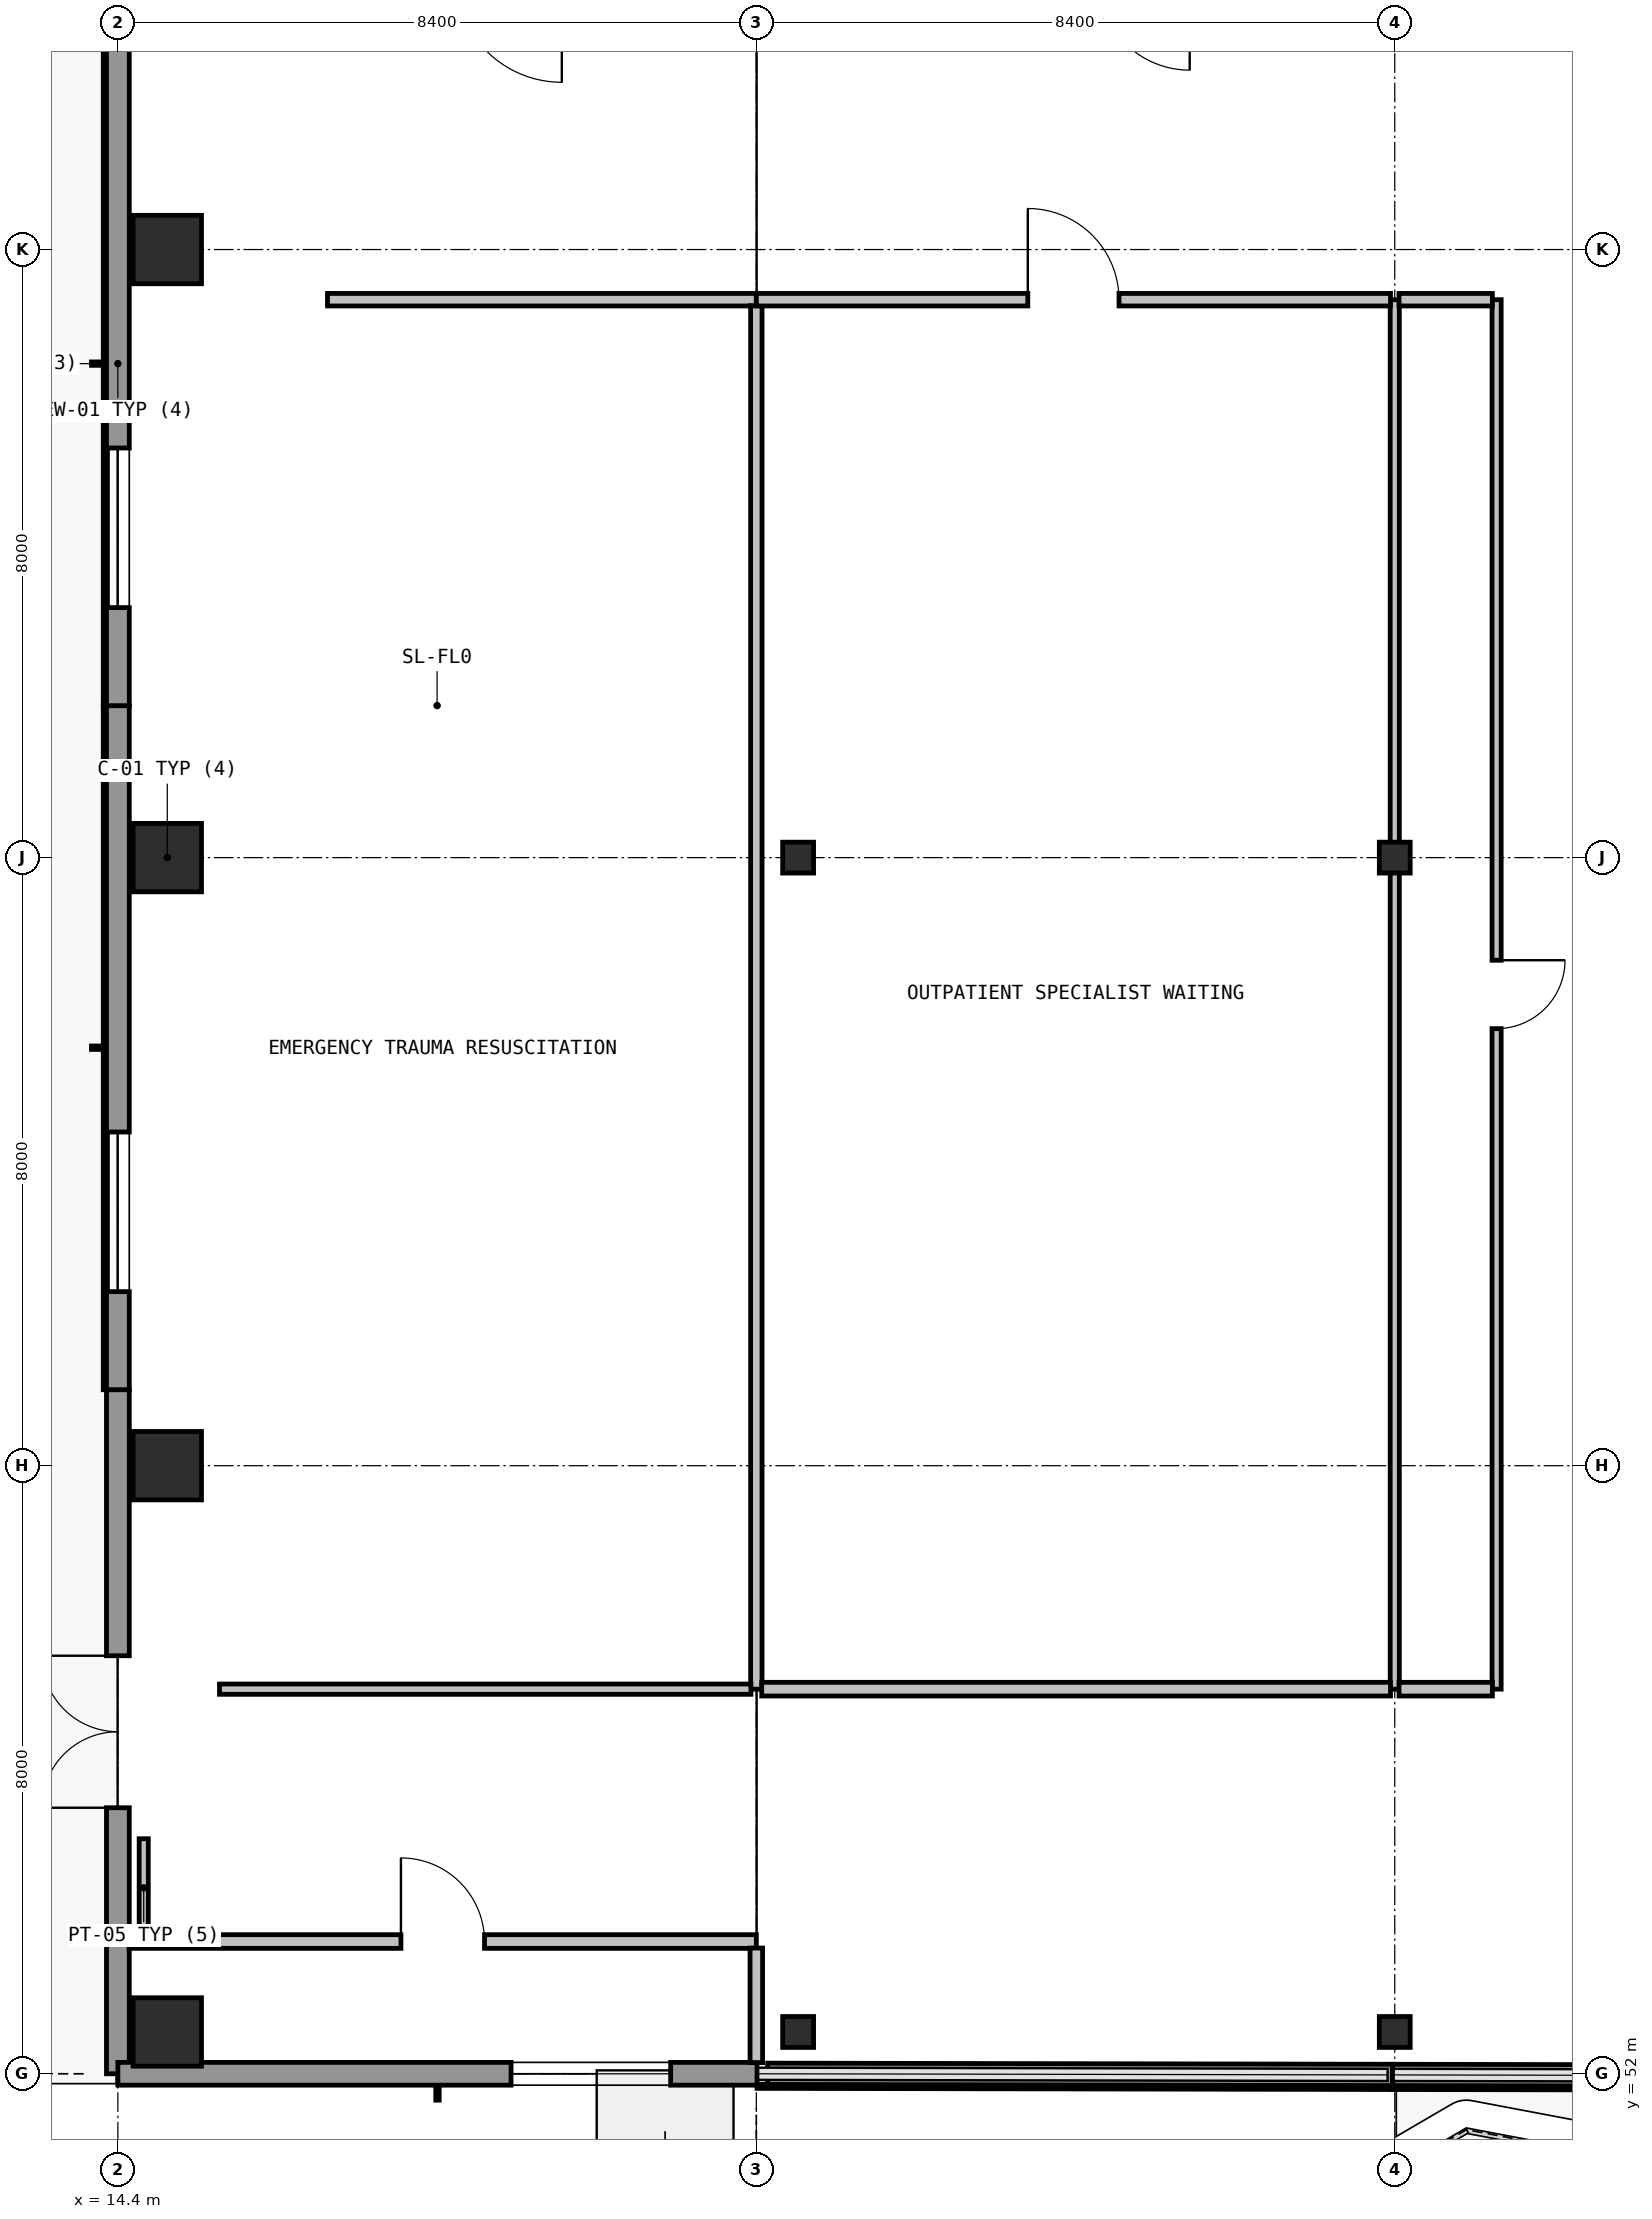
"""IFC4 building model, lengths in metres.
Left out: names, types, materials, properties, quantities, classifications, styles, units other than length and angle.
Written with IfcOpenShell. Run it as: python <this file> out.ifc"""

import sys

from ifc_helpers import new_model, si_unit, direction, frame, frame_2d, origin, origin_2d, place, context, subcontext, project, spatial, rectangle, hollow_circle, extrude, element, fill, save


model = new_model("IFC4")
c1 = context("Model", 3, precision=1e-05, world=origin(), true_north=direction((0.0, 1.0)))
c2 = subcontext(c1, "Body", "Model", "MODEL_VIEW")
j1 = project(units=[si_unit("LENGTHUNIT", "METRE"), si_unit("PLANEANGLEUNIT", "RADIAN")], contexts=[c1])
p1 = place(None, origin())
s1 = spatial("IfcSite", under=j1, at=p1, CompositionType="ELEMENT")
p2 = place(p1, origin())
s2 = spatial("IfcBuilding", under=s1, at=p2, CompositionType="ELEMENT")
p3 = place(p2, origin())
s3 = spatial("IfcBuildingStorey", under=s2, at=p3, CompositionType="ELEMENT", Elevation=0.0)
for number, where, z_axis, x_axis in (
    (1, (23.35, 52.55, 0.0), (0.0, 0.0, 1.0), (1.0, 0.0, 0.0)),
    (2, (23.35, 68.0, 0.0), (0.0, 0.0, 1.0), (1.0, 0.0, 0.0)),
    (3, (31.2, 52.55, 0.0), (0.0, 0.0, 1.0), (1.0, 0.0, 0.0)),
    (4, (31.2, 68.0, 0.0), (0.0, 0.0, 1.0), (1.0, 0.0, 0.0)),
):
    element("IfcColumn", number, at=place(p3, frame(where, z_axis=z_axis, x_axis=x_axis)), inside=s3, PredefinedType="COLUMN", context=c2, shape_type="SweptSolid", body=[
        extrude(hollow_circle(Radius=0.203, WallThickness=0.016, at=origin_2d()), origin(), (0.0, 0.0, 1.0), 5.4),
    ])
for number, where, z_axis, x_axis in (
    (5, (15.05, 52.55, 0.0), (0.0, 0.0, 1.0), (1.0, 0.0, 0.0)),
    (6, (15.05, 60.0, 0.0), (0.0, 0.0, 1.0), (1.0, 0.0, 0.0)),
    (7, (15.05, 68.0, 0.0), (0.0, 0.0, 1.0), (1.0, 0.0, 0.0)),
    (8, (15.05, 76.0, 0.0), (0.0, 0.0, 1.0), (1.0, 0.0, 0.0)),
):
    element("IfcColumn", number, at=place(p3, frame(where, z_axis=z_axis, x_axis=x_axis)), inside=s3, PredefinedType="COLUMN", context=c2, shape_type="SweptSolid", body=[
        extrude(rectangle(XDim=0.9, YDim=0.9, at=origin_2d()), origin(), (0.0, 0.0, 1.0), 5.4),
    ])
p4 = place(p3, frame((14.4, 52.0, 0.0), z_axis=(0.0, 0.0, 1.0), x_axis=(0.0, 1.0, 0.0)))
e9 = element("IfcWall", 9, at=p4, inside=s3, PredefinedType="SOLIDWALL", context=c2, shape_type="SweptSolid", body=[
    extrude(rectangle(XDim=9.0, YDim=0.3, at=frame_2d((4.5, 0.0))), origin(), (0.0, 0.0, 1.0), 5.08),
])
p5 = place(p4, frame((3.5, 0.0, 0.0)))
e10 = element("IfcOpeningElement", 10, at=p5, cuts=e9, PredefinedType="OPENING", context=c2, shape_type="SweptSolid", body=[
    extrude(rectangle(XDim=2.0, YDim=2.3, at=frame_2d((1.0, 1.15))), frame((0.0, 0.16, 0.0), z_axis=(0.0, -1.0, 0.0), x_axis=(1.0, 0.0, 0.0)), (0.0, 0.0, 1.0), 0.32),
])
p6 = place(p3, frame((14.4, 61.0, 0.0), z_axis=(0.0, 0.0, 1.0), x_axis=(0.0, 1.0, 0.0)))
e11 = element("IfcWall", 11, at=p6, inside=s3, PredefinedType="SOLIDWALL", context=c2, shape_type="SweptSolid", body=[
    extrude(rectangle(XDim=8.999, YDim=0.3, at=frame_2d((4.5, 0.0))), origin(), (0.0, 0.0, 1.0), 5.08),
])
p7 = place(p6, frame((1.29, 0.0, 0.96)))
e12 = element("IfcOpeningElement", 12, at=p7, cuts=e11, PredefinedType="OPENING", context=c2, shape_type="SweptSolid", body=[
    extrude(rectangle(XDim=2.1, YDim=1.5, at=frame_2d((1.05, 0.75))), frame((0.0, 0.16, 0.0), z_axis=(0.0, -1.0, 0.0), x_axis=(1.0, 0.0, 0.0)), (0.0, 0.0, 1.0), 0.32),
])
p8 = place(p3, frame((14.4, 69.999, 0.0), z_axis=(0.0, 0.0, 1.0), x_axis=(0.0, 1.0, 0.0)))
e13 = element("IfcWall", 13, at=p8, inside=s3, PredefinedType="SOLIDWALL", context=c2, shape_type="SweptSolid", body=[
    extrude(rectangle(XDim=9.0, YDim=0.3, at=frame_2d((4.5, 0.0))), origin(), (0.0, 0.0, 1.0), 5.08),
])
p9 = place(p8, frame((1.29, 0.0, 0.96)))
e14 = element("IfcOpeningElement", 14, at=p9, cuts=e13, PredefinedType="OPENING", context=c2, shape_type="SweptSolid", body=[
    extrude(rectangle(XDim=2.1, YDim=1.5, at=frame_2d((1.05, 0.75))), frame((0.0, 0.16, 0.0), z_axis=(0.0, -1.0, 0.0), x_axis=(1.0, 0.0, 0.0)), (0.0, 0.0, 1.0), 0.32),
])
p10 = place(p3, frame((39.531, 51.97, 0.0), z_axis=(0.0, 0.0, 1.0), x_axis=(-0.999998360026, 0.001811062053, 0.0)))
e15 = element("IfcWall", 15, at=p10, inside=s3, PredefinedType="SOLIDWALL", context=c2, shape_type="SweptSolid", body=[
    extrude(rectangle(XDim=8.358, YDim=0.28, at=frame_2d((4.179, 0.0))), origin(), (0.0, 0.0, 1.0), 0.94),
])
p11 = place(p3, frame((31.169, 51.985, 0.0), z_axis=(0.0, 0.0, 1.0), x_axis=(-0.999998358775, 0.001811752647, 0.0)))
e16 = element("IfcWall", 16, at=p11, inside=s3, PredefinedType="SOLIDWALL", context=c2, shape_type="SweptSolid", body=[
    extrude(rectangle(XDim=8.22, YDim=0.28, at=frame_2d((4.11, 0.0))), origin(), (0.0, 0.0, 1.0), 0.94),
])
p12 = place(p3, frame((22.809, 52.0, 0.0), z_axis=(0.0, 0.0, 1.0), x_axis=(-1.0, 0.0, 0.0)))
e17 = element("IfcWall", 17, at=p12, inside=s3, PredefinedType="SOLIDWALL", context=c2, shape_type="SweptSolid", body=[
    extrude(rectangle(XDim=8.409, YDim=0.3, at=frame_2d((4.205, 0.0))), origin(), (0.0, 0.0, 1.0), 5.08),
])
p13 = place(p12, frame((1.136, 0.0, 0.96)))
e18 = element("IfcOpeningElement", 18, at=p13, cuts=e17, PredefinedType="OPENING", context=c2, shape_type="SweptSolid", body=[
    extrude(rectangle(XDim=2.1, YDim=1.5, at=frame_2d((1.05, 0.75))), frame((0.0, 0.16, 0.0), z_axis=(0.0, -1.0, 0.0), x_axis=(1.0, 0.0, 0.0)), (0.0, 0.0, 1.0), 0.32),
])
p14 = place(p3, frame((17.158, 75.34, 0.0), z_axis=(0.0, 0.0, 1.0), x_axis=(1.0, 0.0, 0.0)))
e19 = element("IfcWall", 19, at=p14, inside=s3, PredefinedType="PARTITIONING", context=c2, shape_type="SweptSolid", body=[
    extrude(rectangle(XDim=5.642, YDim=0.165, at=frame_2d((2.821, 0.0))), origin(), (0.0, 0.0, 1.0), 5.08),
])
p15 = place(p3, frame((22.8, 75.261, 0.0), z_axis=(0.0, 0.0, 1.0), x_axis=(0.0, -1.0, 0.0)))
e20 = element("IfcWall", 20, at=p15, inside=s3, PredefinedType="PARTITIONING", context=c2, shape_type="SweptSolid", body=[
    extrude(rectangle(XDim=18.201, YDim=0.15, at=frame_2d((9.101, 0.0))), origin(), (0.0, 0.0, 1.0), 5.08),
])
p16 = place(p3, frame((22.729, 57.06, 0.0), z_axis=(0.0, 0.0, 1.0), x_axis=(-1.0, 0.0, 0.0)))
e21 = element("IfcWall", 21, at=p16, inside=s3, PredefinedType="PARTITIONING", context=c2, shape_type="SweptSolid", body=[
    extrude(rectangle(XDim=6.992, YDim=0.135, at=frame_2d((3.496, 0.0))), origin(), (0.0, 0.0, 1.0), 5.08),
])
p17 = place(p3, frame((14.74, 55.092, 0.0), z_axis=(0.0, 0.0, 1.0), x_axis=(0.0, -1.0, 0.0)))
e22 = element("IfcWall", 22, at=p17, inside=s3, PredefinedType="PARTITIONING", context=c2, shape_type="SweptSolid", body=[
    extrude(rectangle(XDim=1.292, YDim=0.12, at=frame_2d((0.646, 0.0))), origin(), (0.0, 0.0, 1.0), 5.08),
])
p18 = place(p3, frame((14.547, 53.74, 0.0), z_axis=(0.0, 0.0, 1.0), x_axis=(1.0, 0.0, 0.0)))
e23 = element("IfcWall", 23, at=p18, inside=s3, PredefinedType="PARTITIONING", context=c2, shape_type="SweptSolid", body=[
    extrude(rectangle(XDim=8.253, YDim=0.18, at=frame_2d((4.126, 0.0))), origin(), (0.0, 0.0, 1.0), 5.08),
])
p19 = place(p18, frame((3.577, 0.0, 0.0)))
e24 = element("IfcOpeningElement", 24, at=p19, cuts=e23, PredefinedType="OPENING", context=c2, shape_type="SweptSolid", body=[
    extrude(rectangle(XDim=1.1, YDim=2.15, at=frame_2d((0.55, 1.075))), frame((0.0, 0.1, 0.0), z_axis=(0.0, -1.0, 0.0), x_axis=(1.0, 0.0, 0.0)), (0.0, 0.0, 1.0), 0.2),
])
p20 = place(p3, frame((22.8, 53.654, 0.0), z_axis=(0.0, 0.0, 1.0), x_axis=(0.0, -1.0, 0.0)))
e25 = element("IfcWall", 25, at=p20, inside=s3, PredefinedType="PARTITIONING", context=c2, shape_type="SweptSolid", body=[
    extrude(rectangle(XDim=1.507, YDim=0.165, at=frame_2d((0.753, 0.0))), origin(), (0.0, 0.0, 1.0), 5.08),
])
p21 = place(p3, frame((31.2, 75.34, 0.0), z_axis=(0.0, 0.0, 1.0), x_axis=(0.0, -1.0, 0.0)))
e26 = element("IfcWall", 26, at=p21, inside=s3, PredefinedType="PARTITIONING", context=c2, shape_type="SweptSolid", body=[
    extrude(rectangle(XDim=18.28, YDim=0.12, at=frame_2d((9.14, 0.0))), origin(), (0.0, 0.0, 1.0), 4.33),
])
p22 = place(p3, frame((31.144, 57.06, 0.0), z_axis=(0.0, 0.0, 1.0), x_axis=(-1.0, 0.0, 0.0)))
e27 = element("IfcWall", 27, at=p22, inside=s3, PredefinedType="PARTITIONING", context=c2, shape_type="SweptSolid", body=[
    extrude(rectangle(XDim=8.273, YDim=0.18, at=frame_2d((4.136, 0.0))), origin(), (0.0, 0.0, 1.0), 5.08),
])
p23 = place(p3, frame((22.8, 75.34, 0.0), z_axis=(0.0, 0.0, 1.0), x_axis=(1.0, 0.0, 0.0)))
e28 = element("IfcWall", 28, at=p23, inside=s3, PredefinedType="PARTITIONING", context=c2, shape_type="SweptSolid", body=[
    extrude(rectangle(XDim=8.344, YDim=0.165, at=frame_2d((4.172, 0.0))), origin(), (0.0, 0.0, 1.0), 5.08),
])
p24 = place(p23, frame((3.572, 0.0, 0.0)))
e29 = element("IfcOpeningElement", 29, at=p24, cuts=e28, PredefinedType="OPENING", context=c2, shape_type="SweptSolid", body=[
    extrude(rectangle(XDim=1.2, YDim=2.15, at=frame_2d((0.6, 1.075))), frame((0.0, 0.093, 0.0), z_axis=(0.0, -1.0, 0.0), x_axis=(1.0, 0.0, 0.0)), (0.0, 0.0, 1.0), 0.185),
])
p25 = place(p3, frame((32.54, 75.34, 0.0), z_axis=(0.0, 0.0, 1.0), x_axis=(0.0, -1.0, 0.0)))
e30 = element("IfcWall", 30, at=p25, inside=s3, PredefinedType="PARTITIONING", context=c2, shape_type="SweptSolid", body=[
    extrude(rectangle(XDim=18.28, YDim=0.12, at=frame_2d((9.14, 0.0))), origin(), (0.0, 0.0, 1.0), 5.08),
])
p26 = place(p25, frame((8.69, 0.0, 0.0)))
e31 = element("IfcOpeningElement", 31, at=p26, cuts=e30, PredefinedType="OPENING", context=c2, shape_type="SweptSolid", body=[
    extrude(rectangle(XDim=0.9, YDim=2.1, at=frame_2d((0.45, 1.05))), frame((0.0, 0.07, 0.0), z_axis=(0.0, -1.0, 0.0), x_axis=(1.0, 0.0, 0.0)), (0.0, 0.0, 1.0), 0.14),
])
p27 = place(p3, frame((32.484, 57.06, 0.0), z_axis=(0.0, 0.0, 1.0), x_axis=(-1.0, 0.0, 0.0)))
e32 = element("IfcWall", 32, at=p27, inside=s3, PredefinedType="PARTITIONING", context=c2, shape_type="SweptSolid", body=[
    extrude(rectangle(XDim=1.228, YDim=0.18, at=frame_2d((0.614, 0.0))), origin(), (0.0, 0.0, 1.0), 5.08),
])
p28 = place(p3, frame((31.256, 75.34, 0.0), z_axis=(0.0, 0.0, 1.0), x_axis=(1.0, 0.0, 0.0)))
e33 = element("IfcWall", 33, at=p28, inside=s3, PredefinedType="PARTITIONING", context=c2, shape_type="SweptSolid", body=[
    extrude(rectangle(XDim=1.228, YDim=0.165, at=frame_2d((0.614, 0.0))), origin(), (0.0, 0.0, 1.0), 5.08),
])
p29 = place(p5, origin())
e34 = element("IfcDoor", 34, at=p29, inside=s3, OperationType="DOUBLE_DOOR_SINGLE_SWING", PredefinedType="DOOR", context=c2, shape_type="SweptSolid", body=[
    extrude(rectangle(XDim=2.0, YDim=2.3, at=frame_2d((1.0, 1.15))), frame((0.0, 0.025, 0.0), z_axis=(0.0, -1.0, 0.0), x_axis=(1.0, 0.0, 0.0)), (0.0, 0.0, 1.0), 0.05),
])
fill(e10, e34)
p30 = place(p7, origin())
e35 = element("IfcWindow", 35, at=p30, inside=s3, PartitioningType="SINGLE_PANEL", PredefinedType="WINDOW", context=c2, shape_type="SweptSolid", body=[
    extrude(rectangle(XDim=2.1, YDim=1.5, at=frame_2d((1.05, 0.75))), frame((0.0, 0.03, 0.0), z_axis=(0.0, -1.0, 0.0), x_axis=(1.0, 0.0, 0.0)), (0.0, 0.0, 1.0), 0.06),
])
fill(e12, e35)
p31 = place(p9, origin())
e36 = element("IfcWindow", 36, at=p31, inside=s3, PartitioningType="SINGLE_PANEL", PredefinedType="WINDOW", context=c2, shape_type="SweptSolid", body=[
    extrude(rectangle(XDim=2.1, YDim=1.5, at=frame_2d((1.05, 0.75))), frame((0.0, 0.03, 0.0), z_axis=(0.0, -1.0, 0.0), x_axis=(1.0, 0.0, 0.0)), (0.0, 0.0, 1.0), 0.06),
])
fill(e14, e36)
p32 = place(p13, origin())
e37 = element("IfcWindow", 37, at=p32, inside=s3, PartitioningType="SINGLE_PANEL", PredefinedType="WINDOW", context=c2, shape_type="SweptSolid", body=[
    extrude(rectangle(XDim=2.1, YDim=1.5, at=frame_2d((1.05, 0.75))), frame((0.0, 0.03, 0.0), z_axis=(0.0, -1.0, 0.0), x_axis=(1.0, 0.0, 0.0)), (0.0, 0.0, 1.0), 0.06),
])
fill(e18, e37)
p33 = place(p19, origin())
e38 = element("IfcDoor", 38, at=p33, inside=s3, OperationType="SINGLE_SWING_LEFT", PredefinedType="DOOR", context=c2, shape_type="SweptSolid", body=[
    extrude(rectangle(XDim=1.1, YDim=2.15, at=frame_2d((0.55, 1.075))), frame((0.0, 0.025, 0.0), z_axis=(0.0, -1.0, 0.0), x_axis=(1.0, 0.0, 0.0)), (0.0, 0.0, 1.0), 0.05),
])
fill(e24, e38)
p34 = place(p24, origin())
e39 = element("IfcDoor", 39, at=p34, inside=s3, OperationType="SINGLE_SWING_LEFT", PredefinedType="DOOR", context=c2, shape_type="SweptSolid", body=[
    extrude(rectangle(XDim=1.2, YDim=2.15, at=frame_2d((0.6, 1.075))), frame((0.0, 0.025, 0.0), z_axis=(0.0, -1.0, 0.0), x_axis=(1.0, 0.0, 0.0)), (0.0, 0.0, 1.0), 0.05),
])
fill(e29, e39)
p35 = place(p26, origin())
e40 = element("IfcDoor", 40, at=p35, inside=s3, OperationType="SINGLE_SWING_RIGHT", PredefinedType="DOOR", context=c2, shape_type="SweptSolid", body=[
    extrude(rectangle(XDim=0.9, YDim=2.1, at=frame_2d((0.45, 1.05))), frame((0.0, 0.025, 0.0), z_axis=(0.0, -1.0, 0.0), x_axis=(1.0, 0.0, 0.0)), (0.0, 0.0, 1.0), 0.05),
])
fill(e31, e40)
save(model, sys.argv[1])
